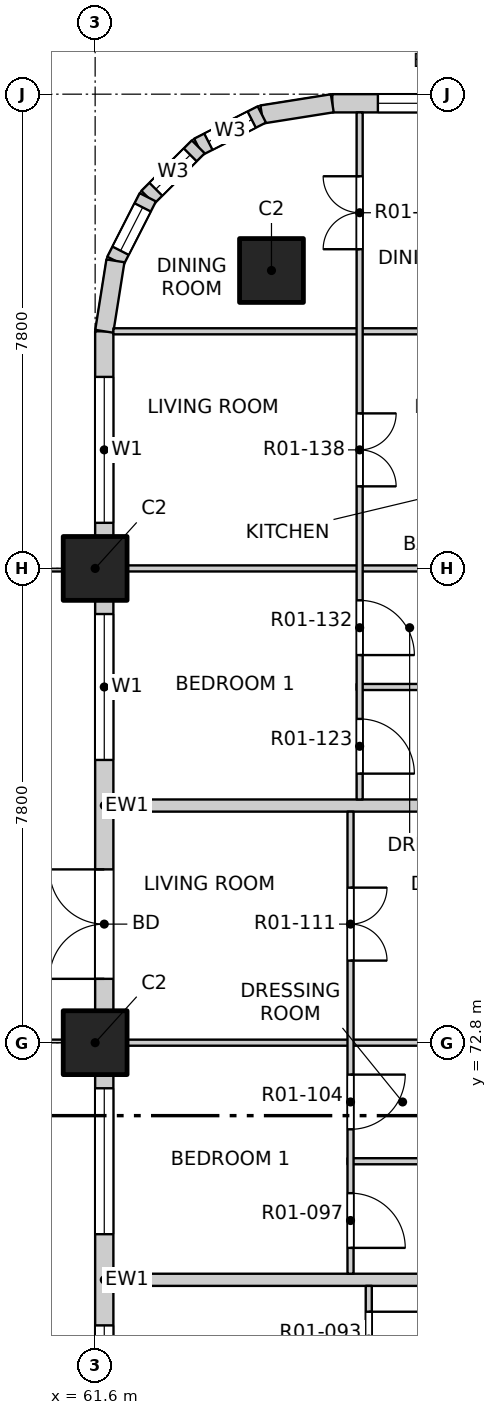
"""IFC4 building model, lengths in metres.
Left out: names, types, materials, properties, quantities, classifications, styles, units other than length and angle.
Written with IfcOpenShell. Run it as: python <this file> out.ifc"""

import sys

from ifc_helpers import new_model, si_unit, direction, frame, frame_2d, origin, origin_2d, place, context, subcontext, project, spatial, rectangle, extrude, element, fill, save


model = new_model("IFC4")
c1 = context("Model", 3, precision=1e-05, world=origin(), true_north=direction((0.0, 1.0)))
c2 = subcontext(c1, "Body", "Model", "MODEL_VIEW")
j1 = project(units=[si_unit("LENGTHUNIT", "METRE"), si_unit("PLANEANGLEUNIT", "RADIAN")], contexts=[c1])
p1 = place(None, origin())
s1 = spatial("IfcSite", under=j1, at=p1, CompositionType="ELEMENT")
p2 = place(p1, origin())
s2 = spatial("IfcBuilding", under=s1, at=p2, CompositionType="ELEMENT")
p3 = place(p2, frame((0.0, 0.0, 26.3)))
s3 = spatial("IfcBuildingStorey", under=s2, at=p3, CompositionType="ELEMENT", Elevation=26.3)
for number, where, z_axis, x_axis in (
    (1, (64.5, 85.5, -0.25), (0.0, 0.0, 1.0), (1.0, 0.0, 0.0)),
    (2, (61.6, 72.8, -0.25), (0.0, 0.0, 1.0), (1.0, 0.0, 0.0)),
    (3, (61.6, 80.6, -0.25), (0.0, 0.0, 1.0), (1.0, 0.0, 0.0)),
):
    element("IfcColumn", number, at=place(p3, frame(where, z_axis=z_axis, x_axis=x_axis)), inside=s3, PredefinedType="COLUMN", context=c2, shape_type="SweptSolid", body=[
        extrude(rectangle(XDim=1.05, YDim=1.05, at=origin_2d()), origin(), (0.0, 0.0, 1.0), 3.4),
    ])
p4 = place(p3, frame((65.5, 88.25, 0.0), z_axis=(0.0, 0.0, 1.0), x_axis=(1.0, 0.0, 0.0)))
e4 = element("IfcWall", 4, at=p4, inside=s3, PredefinedType="SOLIDWALL", context=c2, shape_type="SweptSolid", body=[
    extrude(rectangle(XDim=3.375, YDim=0.3, at=frame_2d((1.688, 0.0))), origin(), (0.0, 0.0, 1.0), 2.7),
])
p5 = place(p4, frame((0.75, 0.0, 0.9)))
e5 = element("IfcOpeningElement", 5, at=p5, cuts=e4, PredefinedType="OPENING", context=c2, shape_type="SweptSolid", body=[
    extrude(rectangle(XDim=2.4, YDim=1.8, at=frame_2d((1.2, 0.9))), frame((0.0, 0.16, 0.0), z_axis=(0.0, -1.0, 0.0), x_axis=(1.0, 0.0, 0.0)), (0.0, 0.0, 1.0), 0.32),
])
p6 = place(p3, frame((61.75, 65.525, 0.0), z_axis=(0.0, 0.0, 1.0), x_axis=(0.0, 1.0, 0.0)))
e6 = element("IfcWall", 6, at=p6, inside=s3, PredefinedType="SOLIDWALL", context=c2, shape_type="SweptSolid", body=[
    extrude(rectangle(XDim=6.75, YDim=0.3, at=frame_2d((3.375, 0.0))), origin(), (0.0, 0.0, 1.0), 2.7),
])
p7 = place(p6, frame((0.225, 0.0, 0.9)))
e7 = element("IfcOpeningElement", 7, at=p7, cuts=e6, PredefinedType="OPENING", context=c2, shape_type="SweptSolid", body=[
    extrude(rectangle(XDim=2.4, YDim=1.8, at=frame_2d((1.2, 0.9))), frame((0.0, 0.16, 0.0), z_axis=(0.0, -1.0, 0.0), x_axis=(1.0, 0.0, 0.0)), (0.0, 0.0, 1.0), 0.32),
])
p8 = place(p6, frame((4.125, 0.0, 0.9)))
e8 = element("IfcOpeningElement", 8, at=p8, cuts=e6, PredefinedType="OPENING", context=c2, shape_type="SweptSolid", body=[
    extrude(rectangle(XDim=2.4, YDim=1.8, at=frame_2d((1.2, 0.9))), frame((0.0, 0.16, 0.0), z_axis=(0.0, -1.0, 0.0), x_axis=(1.0, 0.0, 0.0)), (0.0, 0.0, 1.0), 0.32),
])
p9 = place(p3, frame((61.75, 73.325, 0.0), z_axis=(0.0, 0.0, 1.0), x_axis=(0.0, 1.0, 0.0)))
e9 = element("IfcWall", 9, at=p9, inside=s3, PredefinedType="SOLIDWALL", context=c2, shape_type="SweptSolid", body=[
    extrude(rectangle(XDim=6.75, YDim=0.3, at=frame_2d((3.375, 0.0))), origin(), (0.0, 0.0, 1.0), 2.7),
])
p10 = place(p9, frame((0.525, 0.0, 0.0)))
e10 = element("IfcOpeningElement", 10, at=p10, cuts=e9, PredefinedType="OPENING", context=c2, shape_type="SweptSolid", body=[
    extrude(rectangle(XDim=1.8, YDim=2.4, at=frame_2d((0.9, 1.2))), frame((0.0, 0.16, 0.0), z_axis=(0.0, -1.0, 0.0), x_axis=(1.0, 0.0, 0.0)), (0.0, 0.0, 1.0), 0.32),
])
p11 = place(p9, frame((4.125, 0.0, 0.9)))
e11 = element("IfcOpeningElement", 11, at=p11, cuts=e9, PredefinedType="OPENING", context=c2, shape_type="SweptSolid", body=[
    extrude(rectangle(XDim=2.4, YDim=1.8, at=frame_2d((1.2, 0.9))), frame((0.0, 0.16, 0.0), z_axis=(0.0, -1.0, 0.0), x_axis=(1.0, 0.0, 0.0)), (0.0, 0.0, 1.0), 0.32),
])
p12 = place(p3, frame((61.75, 81.125, 0.0), z_axis=(0.0, 0.0, 1.0), x_axis=(0.0, 1.0, 0.0)))
e12 = element("IfcWall", 12, at=p12, inside=s3, PredefinedType="SOLIDWALL", context=c2, shape_type="SweptSolid", body=[
    extrude(rectangle(XDim=3.375, YDim=0.3, at=frame_2d((1.688, 0.0))), origin(), (0.0, 0.0, 1.0), 2.7),
])
p13 = place(p12, frame((0.225, 0.0, 0.9)))
e13 = element("IfcOpeningElement", 13, at=p13, cuts=e12, PredefinedType="OPENING", context=c2, shape_type="SweptSolid", body=[
    extrude(rectangle(XDim=2.4, YDim=1.8, at=frame_2d((1.2, 0.9))), frame((0.0, 0.16, 0.0), z_axis=(0.0, -1.0, 0.0), x_axis=(1.0, 0.0, 0.0)), (0.0, 0.0, 1.0), 0.32),
])
p14 = place(p3, frame((65.5, 88.25, 0.0), z_axis=(0.0, 0.0, 1.0), x_axis=(-0.987678452879, -0.156496880861, 0.0)))
e14 = element("IfcWall", 14, at=p14, inside=s3, PredefinedType="SOLIDWALL", context=c2, shape_type="SweptSolid", body=[
    extrude(rectangle(XDim=1.173, YDim=0.3, at=frame_2d((0.586, 0.0))), origin(), (0.0, 0.0, 1.0), 2.7),
])
p15 = place(p3, frame((64.341, 88.066, 0.0), z_axis=(0.0, 0.0, 1.0), x_axis=(-0.890988677504, -0.454025524128, 0.0)))
e15 = element("IfcWall", 15, at=p15, inside=s3, PredefinedType="SOLIDWALL", context=c2, shape_type="SweptSolid", body=[
    extrude(rectangle(XDim=1.173, YDim=0.3, at=frame_2d((0.587, 0.0))), origin(), (0.0, 0.0, 1.0), 2.7),
])
p16 = place(p15, frame((0.187, 0.0, 0.9)))
e16 = element("IfcOpeningElement", 16, at=p16, cuts=e15, PredefinedType="OPENING", context=c2, shape_type="SweptSolid", body=[
    extrude(rectangle(XDim=0.8, YDim=1.2, at=frame_2d((0.4, 0.6))), frame((0.0, 0.16, 0.0), z_axis=(0.0, -1.0, 0.0), x_axis=(1.0, 0.0, 0.0)), (0.0, 0.0, 1.0), 0.32),
])
p17 = place(p3, frame((63.296, 87.534, 0.0), z_axis=(0.0, 0.0, 1.0), x_axis=(-0.707106781187, -0.707106781187, 0.0)))
e17 = element("IfcWall", 17, at=p17, inside=s3, PredefinedType="SOLIDWALL", context=c2, shape_type="SweptSolid", body=[
    extrude(rectangle(XDim=1.173, YDim=0.3, at=frame_2d((0.586, 0.0))), origin(), (0.0, 0.0, 1.0), 2.7),
])
p18 = place(p17, frame((0.187, 0.0, 0.9)))
e18 = element("IfcOpeningElement", 18, at=p18, cuts=e17, PredefinedType="OPENING", context=c2, shape_type="SweptSolid", body=[
    extrude(rectangle(XDim=0.8, YDim=1.2, at=frame_2d((0.4, 0.6))), frame((0.0, 0.16, 0.0), z_axis=(0.0, -1.0, 0.0), x_axis=(1.0, 0.0, 0.0)), (0.0, 0.0, 1.0), 0.32),
])
p19 = place(p3, frame((62.466, 86.704, 0.0), z_axis=(0.0, 0.0, 1.0), x_axis=(-0.454025524128, -0.890988677504, 0.0)))
e19 = element("IfcWall", 19, at=p19, inside=s3, PredefinedType="SOLIDWALL", context=c2, shape_type="SweptSolid", body=[
    extrude(rectangle(XDim=1.173, YDim=0.3, at=frame_2d((0.587, 0.0))), origin(), (0.0, 0.0, 1.0), 2.7),
])
p20 = place(p19, frame((0.187, 0.0, 0.9)))
e20 = element("IfcOpeningElement", 20, at=p20, cuts=e19, PredefinedType="OPENING", context=c2, shape_type="SweptSolid", body=[
    extrude(rectangle(XDim=0.8, YDim=1.2, at=frame_2d((0.4, 0.6))), frame((0.0, 0.16, 0.0), z_axis=(0.0, -1.0, 0.0), x_axis=(1.0, 0.0, 0.0)), (0.0, 0.0, 1.0), 0.32),
])
p21 = place(p3, frame((61.934, 85.659, 0.0), z_axis=(0.0, 0.0, 1.0), x_axis=(-0.156496880861, -0.987678452879, 0.0)))
e21 = element("IfcWall", 21, at=p21, inside=s3, PredefinedType="SOLIDWALL", context=c2, shape_type="SweptSolid", body=[
    extrude(rectangle(XDim=1.173, YDim=0.3, at=frame_2d((0.586, 0.0))), origin(), (0.0, 0.0, 1.0), 2.7),
])
p22 = place(p3, frame((61.9, 68.9, 0.0), z_axis=(0.0, 0.0, 1.0), x_axis=(1.0, 0.0, 0.0)))
e22 = element("IfcWall", 22, at=p22, inside=s3, PredefinedType="PARTITIONING", context=c2, shape_type="SweptSolid", body=[
    extrude(rectangle(XDim=11.5, YDim=0.2, at=frame_2d((5.75, 0.0))), origin(), (0.0, 0.0, 1.0), 3.15),
])
p23 = place(p3, frame((65.75, 70.85, 0.0), z_axis=(0.0, 0.0, 1.0), x_axis=(1.0, 0.0, 0.0)))
e23 = element("IfcWall", 23, at=p23, inside=s3, PredefinedType="PARTITIONING", context=c2, shape_type="SweptSolid", body=[
    extrude(rectangle(XDim=3.7, YDim=0.1, at=frame_2d((1.85, 0.0))), origin(), (0.0, 0.0, 1.0), 3.15),
])
p24 = place(p3, frame((61.9, 72.8, 0.0), z_axis=(0.0, 0.0, 1.0), x_axis=(1.0, 0.0, 0.0)))
e24 = element("IfcWall", 24, at=p24, inside=s3, PredefinedType="PARTITIONING", context=c2, shape_type="SweptSolid", body=[
    extrude(rectangle(XDim=7.55, YDim=0.1, at=frame_2d((3.775, 0.0))), origin(), (0.0, 0.0, 1.0), 2.55),
])
p25 = place(p3, frame((61.9, 76.7, 0.0), z_axis=(0.0, 0.0, 1.0), x_axis=(1.0, 0.0, 0.0)))
e25 = element("IfcWall", 25, at=p25, inside=s3, PredefinedType="PARTITIONING", context=c2, shape_type="SweptSolid", body=[
    extrude(rectangle(XDim=11.5, YDim=0.2, at=frame_2d((5.75, 0.0))), origin(), (0.0, 0.0, 1.0), 3.15),
])
p26 = place(p3, frame((65.9, 78.65, 0.0), z_axis=(0.0, 0.0, 1.0), x_axis=(1.0, 0.0, 0.0)))
e26 = element("IfcWall", 26, at=p26, inside=s3, PredefinedType="PARTITIONING", context=c2, shape_type="SweptSolid", body=[
    extrude(rectangle(XDim=3.55, YDim=0.1, at=frame_2d((1.775, 0.0))), origin(), (0.0, 0.0, 1.0), 3.15),
])
p27 = place(p3, frame((61.9, 80.6, 0.0), z_axis=(0.0, 0.0, 1.0), x_axis=(1.0, 0.0, 0.0)))
e27 = element("IfcWall", 27, at=p27, inside=s3, PredefinedType="PARTITIONING", context=c2, shape_type="SweptSolid", body=[
    extrude(rectangle(XDim=7.55, YDim=0.1, at=frame_2d((3.775, 0.0))), origin(), (0.0, 0.0, 1.0), 2.55),
])
p28 = place(p3, frame((61.9, 84.5, 0.0), z_axis=(0.0, 0.0, 1.0), x_axis=(1.0, 0.0, 0.0)))
e28 = element("IfcWall", 28, at=p28, inside=s3, PredefinedType="PARTITIONING", context=c2, shape_type="SweptSolid", body=[
    extrude(rectangle(XDim=11.5, YDim=0.1, at=frame_2d((5.75, 0.0))), origin(), (0.0, 0.0, 1.0), 3.15),
])
p29 = place(p28, frame((7.965, 0.0, 0.0)))
e29 = element("IfcOpeningElement", 29, at=p29, cuts=e28, PredefinedType="OPENING", context=c2, shape_type="SweptSolid", body=[
    extrude(rectangle(XDim=0.9, YDim=2.1, at=frame_2d((0.45, 1.05))), frame((0.0, 0.06, 0.0), z_axis=(0.0, -1.0, 0.0), x_axis=(1.0, 0.0, 0.0)), (0.0, 0.0, 1.0), 0.12),
])
p30 = place(p3, frame((65.8, 69.0, 0.0), z_axis=(0.0, 0.0, 1.0), x_axis=(0.0, 1.0, 0.0)))
e30 = element("IfcWall", 30, at=p30, inside=s3, PredefinedType="PARTITIONING", context=c2, shape_type="SweptSolid", body=[
    extrude(rectangle(XDim=7.6, YDim=0.1, at=frame_2d((3.8, 0.0))), origin(), (0.0, 0.0, 1.0), 3.15),
])
p31 = place(p30, frame((0.425, 0.0, 0.0)))
e31 = element("IfcOpeningElement", 31, at=p31, cuts=e30, PredefinedType="OPENING", context=c2, shape_type="SweptSolid", body=[
    extrude(rectangle(XDim=0.9, YDim=2.1, at=frame_2d((0.45, 1.05))), frame((0.0, 0.06, 0.0), z_axis=(0.0, -1.0, 0.0), x_axis=(1.0, 0.0, 0.0)), (0.0, 0.0, 1.0), 0.12),
])
p32 = place(p30, frame((2.375, 0.0, 0.0)))
e32 = element("IfcOpeningElement", 32, at=p32, cuts=e30, PredefinedType="OPENING", context=c2, shape_type="SweptSolid", body=[
    extrude(rectangle(XDim=0.9, YDim=2.1, at=frame_2d((0.45, 1.05))), frame((0.0, 0.06, 0.0), z_axis=(0.0, -1.0, 0.0), x_axis=(1.0, 0.0, 0.0)), (0.0, 0.0, 1.0), 0.12),
])
p33 = place(p30, frame((5.15, 0.0, 0.0)))
e33 = element("IfcOpeningElement", 33, at=p33, cuts=e30, PredefinedType="OPENING", context=c2, shape_type="SweptSolid", body=[
    extrude(rectangle(XDim=1.2, YDim=2.1, at=frame_2d((0.6, 1.05))), frame((0.0, 0.06, 0.0), z_axis=(0.0, -1.0, 0.0), x_axis=(1.0, 0.0, 0.0)), (0.0, 0.0, 1.0), 0.12),
])
p34 = place(p3, frame((65.95, 76.8, 0.0), z_axis=(0.0, 0.0, 1.0), x_axis=(0.0, 1.0, 0.0)))
e34 = element("IfcWall", 34, at=p34, inside=s3, PredefinedType="PARTITIONING", context=c2, shape_type="SweptSolid", body=[
    extrude(rectangle(XDim=11.3, YDim=0.1, at=frame_2d((5.65, 0.0))), origin(), (0.0, 0.0, 1.0), 3.15),
])
p35 = place(p34, frame((0.425, 0.0, 0.0)))
e35 = element("IfcOpeningElement", 35, at=p35, cuts=e34, PredefinedType="OPENING", context=c2, shape_type="SweptSolid", body=[
    extrude(rectangle(XDim=0.9, YDim=2.1, at=frame_2d((0.45, 1.05))), frame((0.0, 0.06, 0.0), z_axis=(0.0, -1.0, 0.0), x_axis=(1.0, 0.0, 0.0)), (0.0, 0.0, 1.0), 0.12),
])
p36 = place(p34, frame((2.375, 0.0, 0.0)))
e36 = element("IfcOpeningElement", 36, at=p36, cuts=e34, PredefinedType="OPENING", context=c2, shape_type="SweptSolid", body=[
    extrude(rectangle(XDim=0.9, YDim=2.1, at=frame_2d((0.45, 1.05))), frame((0.0, 0.06, 0.0), z_axis=(0.0, -1.0, 0.0), x_axis=(1.0, 0.0, 0.0)), (0.0, 0.0, 1.0), 0.12),
])
p37 = place(p34, frame((5.15, 0.0, 0.0)))
e37 = element("IfcOpeningElement", 37, at=p37, cuts=e34, PredefinedType="OPENING", context=c2, shape_type="SweptSolid", body=[
    extrude(rectangle(XDim=1.2, YDim=2.1, at=frame_2d((0.6, 1.05))), frame((0.0, 0.06, 0.0), z_axis=(0.0, -1.0, 0.0), x_axis=(1.0, 0.0, 0.0)), (0.0, 0.0, 1.0), 0.12),
])
p38 = place(p34, frame((9.05, 0.0, 0.0)))
e38 = element("IfcOpeningElement", 38, at=p38, cuts=e34, PredefinedType="OPENING", context=c2, shape_type="SweptSolid", body=[
    extrude(rectangle(XDim=1.2, YDim=2.1, at=frame_2d((0.6, 1.05))), frame((0.0, 0.06, 0.0), z_axis=(0.0, -1.0, 0.0), x_axis=(1.0, 0.0, 0.0)), (0.0, 0.0, 1.0), 0.12),
])
p39 = place(p3, frame((66.1, 61.2, 0.0), z_axis=(0.0, 0.0, 1.0), x_axis=(0.0, 1.0, 0.0)))
e39 = element("IfcWall", 39, at=p39, inside=s3, PredefinedType="PARTITIONING", context=c2, shape_type="SweptSolid", body=[
    extrude(rectangle(XDim=7.6, YDim=0.1, at=frame_2d((3.8, 0.0))), origin(), (0.0, 0.0, 1.0), 3.15),
])
p40 = place(p39, frame((1.25, 0.0, 0.0)))
e40 = element("IfcOpeningElement", 40, at=p40, cuts=e39, PredefinedType="OPENING", context=c2, shape_type="SweptSolid", body=[
    extrude(rectangle(XDim=1.2, YDim=2.1, at=frame_2d((0.6, 1.05))), frame((0.0, 0.06, 0.0), z_axis=(0.0, -1.0, 0.0), x_axis=(1.0, 0.0, 0.0)), (0.0, 0.0, 1.0), 0.12),
])
p41 = place(p39, frame((4.325, 0.0, 0.0)))
e41 = element("IfcOpeningElement", 41, at=p41, cuts=e39, PredefinedType="OPENING", context=c2, shape_type="SweptSolid", body=[
    extrude(rectangle(XDim=0.9, YDim=2.1, at=frame_2d((0.45, 1.05))), frame((0.0, 0.06, 0.0), z_axis=(0.0, -1.0, 0.0), x_axis=(1.0, 0.0, 0.0)), (0.0, 0.0, 1.0), 0.12),
])
p42 = place(p39, frame((6.275, 0.0, 0.0)))
e42 = element("IfcOpeningElement", 42, at=p42, cuts=e39, PredefinedType="OPENING", context=c2, shape_type="SweptSolid", body=[
    extrude(rectangle(XDim=0.9, YDim=2.1, at=frame_2d((0.45, 1.05))), frame((0.0, 0.06, 0.0), z_axis=(0.0, -1.0, 0.0), x_axis=(1.0, 0.0, 0.0)), (0.0, 0.0, 1.0), 0.12),
])
p43 = place(p5, origin())
e43 = element("IfcWindow", 43, at=p43, inside=s3, PartitioningType="DOUBLE_PANEL_VERTICAL", PredefinedType="WINDOW", context=c2, shape_type="SweptSolid", body=[
    extrude(rectangle(XDim=2.4, YDim=1.8, at=frame_2d((1.2, 0.9))), frame((0.0, 0.03, 0.0), z_axis=(0.0, -1.0, 0.0), x_axis=(1.0, 0.0, 0.0)), (0.0, 0.0, 1.0), 0.06),
])
fill(e5, e43)
p44 = place(p7, origin())
e44 = element("IfcWindow", 44, at=p44, inside=s3, PartitioningType="DOUBLE_PANEL_VERTICAL", PredefinedType="WINDOW", context=c2, shape_type="SweptSolid", body=[
    extrude(rectangle(XDim=2.4, YDim=1.8, at=frame_2d((1.2, 0.9))), frame((0.0, 0.03, 0.0), z_axis=(0.0, -1.0, 0.0), x_axis=(1.0, 0.0, 0.0)), (0.0, 0.0, 1.0), 0.06),
])
fill(e7, e44)
p45 = place(p8, origin())
e45 = element("IfcWindow", 45, at=p45, inside=s3, PartitioningType="DOUBLE_PANEL_VERTICAL", PredefinedType="WINDOW", context=c2, shape_type="SweptSolid", body=[
    extrude(rectangle(XDim=2.4, YDim=1.8, at=frame_2d((1.2, 0.9))), frame((0.0, 0.03, 0.0), z_axis=(0.0, -1.0, 0.0), x_axis=(1.0, 0.0, 0.0)), (0.0, 0.0, 1.0), 0.06),
])
fill(e8, e45)
p46 = place(p10, origin())
e46 = element("IfcDoor", 46, at=p46, inside=s3, OperationType="DOUBLE_DOOR_SINGLE_SWING", PredefinedType="DOOR", context=c2, shape_type="SweptSolid", body=[
    extrude(rectangle(XDim=1.8, YDim=2.4, at=frame_2d((0.9, 1.2))), frame((0.0, 0.025, 0.0), z_axis=(0.0, -1.0, 0.0), x_axis=(1.0, 0.0, 0.0)), (0.0, 0.0, 1.0), 0.05),
])
fill(e10, e46)
p47 = place(p11, origin())
e47 = element("IfcWindow", 47, at=p47, inside=s3, PartitioningType="DOUBLE_PANEL_VERTICAL", PredefinedType="WINDOW", context=c2, shape_type="SweptSolid", body=[
    extrude(rectangle(XDim=2.4, YDim=1.8, at=frame_2d((1.2, 0.9))), frame((0.0, 0.03, 0.0), z_axis=(0.0, -1.0, 0.0), x_axis=(1.0, 0.0, 0.0)), (0.0, 0.0, 1.0), 0.06),
])
fill(e11, e47)
p48 = place(p13, origin())
e48 = element("IfcWindow", 48, at=p48, inside=s3, PartitioningType="DOUBLE_PANEL_VERTICAL", PredefinedType="WINDOW", context=c2, shape_type="SweptSolid", body=[
    extrude(rectangle(XDim=2.4, YDim=1.8, at=frame_2d((1.2, 0.9))), frame((0.0, 0.03, 0.0), z_axis=(0.0, -1.0, 0.0), x_axis=(1.0, 0.0, 0.0)), (0.0, 0.0, 1.0), 0.06),
])
fill(e13, e48)
p49 = place(p16, origin())
e49 = element("IfcWindow", 49, at=p49, inside=s3, PartitioningType="SINGLE_PANEL", PredefinedType="WINDOW", context=c2, shape_type="SweptSolid", body=[
    extrude(rectangle(XDim=0.8, YDim=1.2, at=frame_2d((0.4, 0.6))), frame((0.0, 0.03, 0.0), z_axis=(0.0, -1.0, 0.0), x_axis=(1.0, 0.0, 0.0)), (0.0, 0.0, 1.0), 0.06),
])
fill(e16, e49)
p50 = place(p18, origin())
e50 = element("IfcWindow", 50, at=p50, inside=s3, PartitioningType="SINGLE_PANEL", PredefinedType="WINDOW", context=c2, shape_type="SweptSolid", body=[
    extrude(rectangle(XDim=0.8, YDim=1.2, at=frame_2d((0.4, 0.6))), frame((0.0, 0.03, 0.0), z_axis=(0.0, -1.0, 0.0), x_axis=(1.0, 0.0, 0.0)), (0.0, 0.0, 1.0), 0.06),
])
fill(e18, e50)
p51 = place(p20, origin())
e51 = element("IfcWindow", 51, at=p51, inside=s3, PartitioningType="SINGLE_PANEL", PredefinedType="WINDOW", context=c2, shape_type="SweptSolid", body=[
    extrude(rectangle(XDim=0.8, YDim=1.2, at=frame_2d((0.4, 0.6))), frame((0.0, 0.03, 0.0), z_axis=(0.0, -1.0, 0.0), x_axis=(1.0, 0.0, 0.0)), (0.0, 0.0, 1.0), 0.06),
])
fill(e20, e51)
p52 = place(p42, origin())
e52 = element("IfcDoor", 52, at=p52, inside=s3, OperationType="SINGLE_SWING_LEFT", PredefinedType="DOOR", context=c2, shape_type="SweptSolid", body=[
    extrude(rectangle(XDim=0.9, YDim=2.1, at=frame_2d((0.45, 1.05))), frame((0.0, 0.025, 0.0), z_axis=(0.0, -1.0, 0.0), x_axis=(1.0, 0.0, 0.0)), (0.0, 0.0, 1.0), 0.05),
])
fill(e42, e52)
p53 = place(p31, origin())
e53 = element("IfcDoor", 53, at=p53, inside=s3, OperationType="SINGLE_SWING_RIGHT", PredefinedType="DOOR", context=c2, shape_type="SweptSolid", body=[
    extrude(rectangle(XDim=0.9, YDim=2.1, at=frame_2d((0.45, 1.05))), frame((0.0, 0.025, 0.0), z_axis=(0.0, -1.0, 0.0), x_axis=(1.0, 0.0, 0.0)), (0.0, 0.0, 1.0), 0.05),
])
fill(e31, e53)
p54 = place(p32, origin())
e54 = element("IfcDoor", 54, at=p54, inside=s3, OperationType="SINGLE_SWING_LEFT", PredefinedType="DOOR", context=c2, shape_type="SweptSolid", body=[
    extrude(rectangle(XDim=0.9, YDim=2.1, at=frame_2d((0.45, 1.05))), frame((0.0, 0.025, 0.0), z_axis=(0.0, -1.0, 0.0), x_axis=(1.0, 0.0, 0.0)), (0.0, 0.0, 1.0), 0.05),
])
fill(e32, e54)
p55 = place(p33, origin())
e55 = element("IfcDoor", 55, at=p55, inside=s3, OperationType="DOUBLE_DOOR_SINGLE_SWING", PredefinedType="DOOR", context=c2, shape_type="SweptSolid", body=[
    extrude(rectangle(XDim=1.2, YDim=2.1, at=frame_2d((0.6, 1.05))), frame((0.0, 0.025, 0.0), z_axis=(0.0, -1.0, 0.0), x_axis=(1.0, 0.0, 0.0)), (0.0, 0.0, 1.0), 0.05),
])
fill(e33, e55)
p56 = place(p35, origin())
e56 = element("IfcDoor", 56, at=p56, inside=s3, OperationType="SINGLE_SWING_RIGHT", PredefinedType="DOOR", context=c2, shape_type="SweptSolid", body=[
    extrude(rectangle(XDim=0.9, YDim=2.1, at=frame_2d((0.45, 1.05))), frame((0.0, 0.025, 0.0), z_axis=(0.0, -1.0, 0.0), x_axis=(1.0, 0.0, 0.0)), (0.0, 0.0, 1.0), 0.05),
])
fill(e35, e56)
p57 = place(p36, origin())
e57 = element("IfcDoor", 57, at=p57, inside=s3, OperationType="SINGLE_SWING_RIGHT", PredefinedType="DOOR", context=c2, shape_type="SweptSolid", body=[
    extrude(rectangle(XDim=0.9, YDim=2.1, at=frame_2d((0.45, 1.05))), frame((0.0, 0.025, 0.0), z_axis=(0.0, -1.0, 0.0), x_axis=(1.0, 0.0, 0.0)), (0.0, 0.0, 1.0), 0.05),
])
fill(e36, e57)
p58 = place(p37, origin())
e58 = element("IfcDoor", 58, at=p58, inside=s3, OperationType="DOUBLE_DOOR_SINGLE_SWING", PredefinedType="DOOR", context=c2, shape_type="SweptSolid", body=[
    extrude(rectangle(XDim=1.2, YDim=2.1, at=frame_2d((0.6, 1.05))), frame((0.0, 0.025, 0.0), z_axis=(0.0, -1.0, 0.0), x_axis=(1.0, 0.0, 0.0)), (0.0, 0.0, 1.0), 0.05),
])
fill(e37, e58)
p59 = place(p38, origin())
e59 = element("IfcDoor", 59, at=p59, inside=s3, OperationType="DOUBLE_DOOR_SINGLE_SWING", PredefinedType="DOOR", context=c2, shape_type="SweptSolid", body=[
    extrude(rectangle(XDim=1.2, YDim=2.1, at=frame_2d((0.6, 1.05))), frame((0.0, 0.025, 0.0), z_axis=(0.0, -1.0, 0.0), x_axis=(1.0, 0.0, 0.0)), (0.0, 0.0, 1.0), 0.05),
])
fill(e38, e59)
save(model, sys.argv[1])
